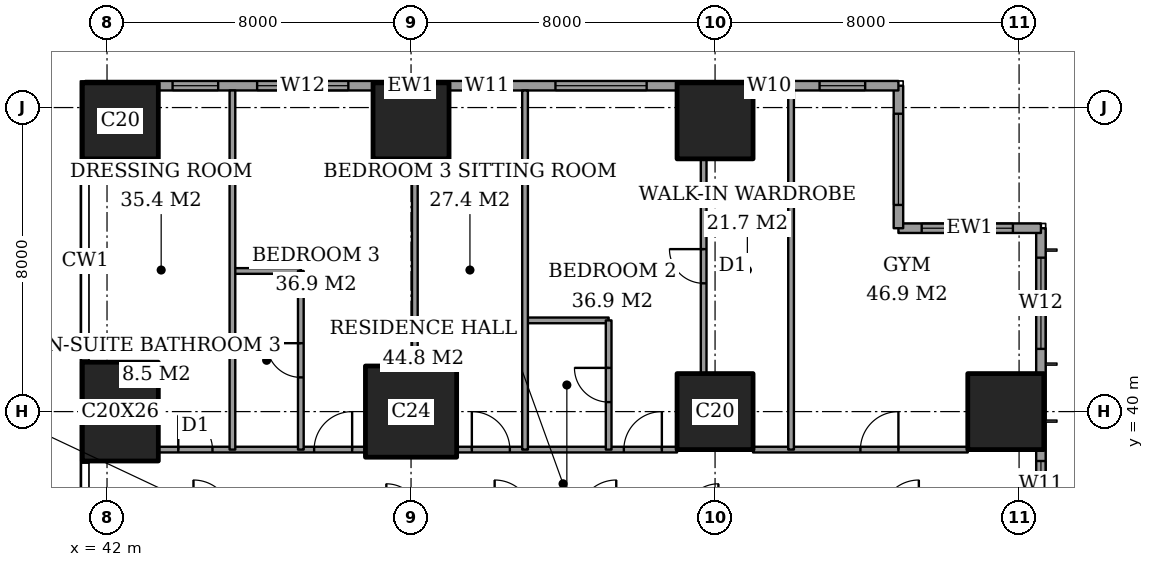
"""IFC4 building model, lengths in metres.
Left out: names, types, materials, properties, quantities, classifications, styles, units other than length and angle.
Written with IfcOpenShell. Run it as: python <this file> out.ifc"""

import sys

from ifc_helpers import new_model, si_unit, direction, frame, frame_2d, origin, origin_2d, place, context, subcontext, project, spatial, rectangle, extrude, element, fill, save


model = new_model("IFC4")
c1 = context("Model", 3, precision=1e-05, world=origin(), true_north=direction((0.0, 1.0)))
c2 = subcontext(c1, "Body", "Model", "MODEL_VIEW")
j1 = project(units=[si_unit("LENGTHUNIT", "METRE"), si_unit("PLANEANGLEUNIT", "RADIAN")], contexts=[c1])
p1 = place(None, origin())
s1 = spatial("IfcSite", under=j1, at=p1, CompositionType="ELEMENT")
p2 = place(p1, origin())
s2 = spatial("IfcBuilding", under=s1, at=p2, CompositionType="ELEMENT")
p3 = place(p2, frame((0.0, 0.0, 146.6)))
s3 = spatial("IfcBuildingStorey", under=s2, at=p3, CompositionType="ELEMENT", Elevation=146.6)
p4 = place(p3, frame((42.35, 40.0, 0.0), z_axis=(0.0, 0.0, 1.0), x_axis=(1.0, 0.0, 0.0)))
e1 = element("IfcColumn", 1, at=p4, inside=s3, PredefinedType="COLUMN", context=c2, shape_type="SweptSolid", body=[
    extrude(rectangle(XDim=2.0, YDim=2.6, at=origin_2d()), origin(), (0.0, 0.0, 1.0), 3.6),
])
p5 = place(p3, frame((42.35, 47.65, 0.0), z_axis=(0.0, 0.0, 1.0), x_axis=(1.0, 0.0, 0.0)))
e2 = element("IfcColumn", 2, at=p5, inside=s3, PredefinedType="COLUMN", context=c2, shape_type="SweptSolid", body=[
    extrude(rectangle(XDim=2.0, YDim=2.0, at=origin_2d()), origin(), (0.0, 0.0, 1.0), 3.6),
])
p6 = place(p3, frame((50.0, 40.0, 0.0), z_axis=(0.0, 0.0, 1.0), x_axis=(1.0, 0.0, 0.0)))
e3 = element("IfcColumn", 3, at=p6, inside=s3, PredefinedType="COLUMN", context=c2, shape_type="SweptSolid", body=[
    extrude(rectangle(XDim=2.4, YDim=2.4, at=origin_2d()), origin(), (0.0, 0.0, 1.0), 3.6),
])
for number, where, z_axis, x_axis in (
    (4, (50.0, 47.65, 0.0), (0.0, 0.0, 1.0), (1.0, 0.0, 0.0)),
    (5, (58.0, 40.0, 0.0), (0.0, 0.0, 1.0), (1.0, 0.0, 0.0)),
    (6, (58.0, 47.65, 0.0), (0.0, 0.0, 1.0), (1.0, 0.0, 0.0)),
    (7, (65.65, 40.0, 0.0), (0.0, 0.0, 1.0), (1.0, 0.0, 0.0)),
):
    element("IfcColumn", number, at=place(p3, frame(where, z_axis=z_axis, x_axis=x_axis)), inside=s3, PredefinedType="COLUMN", context=c2, shape_type="SweptSolid", body=[
        extrude(rectangle(XDim=2.0, YDim=2.0, at=origin_2d()), origin(), (0.0, 0.0, 1.0), 3.6),
    ])
p7 = place(p3, frame((66.575, 3.175, 0.0), z_axis=(0.0, 0.0, 1.0), x_axis=(0.0, 1.0, 0.0)))
e8 = element("IfcWall", 8, at=p7, inside=s3, PredefinedType="SOLIDWALL", context=c2, shape_type="SweptSolid", body=[
    extrude(rectangle(XDim=41.65, YDim=0.25, at=frame_2d((20.825, 0.0))), origin(), (0.0, 0.0, 1.0), 3.6),
])
p8 = place(p7, frame((0.775, 0.0, 0.4)))
e9 = element("IfcOpeningElement", 9, at=p8, cuts=e8, PredefinedType="OPENING", context=c2, shape_type="SweptSolid", body=[
    extrude(rectangle(XDim=2.4, YDim=2.2, at=frame_2d((1.2, 1.1))), frame((0.0, 0.135, 0.0), z_axis=(0.0, -1.0, 0.0), x_axis=(1.0, 0.0, 0.0)), (0.0, 0.0, 1.0), 0.27),
])
p9 = place(p7, frame((6.1, 0.0, 0.4)))
e10 = element("IfcOpeningElement", 10, at=p9, cuts=e8, PredefinedType="OPENING", context=c2, shape_type="SweptSolid", body=[
    extrude(rectangle(XDim=1.2, YDim=2.2, at=frame_2d((0.6, 1.1))), frame((0.0, 0.135, 0.0), z_axis=(0.0, -1.0, 0.0), x_axis=(1.0, 0.0, 0.0)), (0.0, 0.0, 1.0), 0.27),
])
p10 = place(p7, frame((8.275, 0.0, 0.4)))
e11 = element("IfcOpeningElement", 11, at=p10, cuts=e8, PredefinedType="OPENING", context=c2, shape_type="SweptSolid", body=[
    extrude(rectangle(XDim=2.4, YDim=2.2, at=frame_2d((1.2, 1.1))), frame((0.0, 0.135, 0.0), z_axis=(0.0, -1.0, 0.0), x_axis=(1.0, 0.0, 0.0)), (0.0, 0.0, 1.0), 0.27),
])
p11 = place(p7, frame((15.775, 0.0, 0.4)))
e12 = element("IfcOpeningElement", 12, at=p11, cuts=e8, PredefinedType="OPENING", context=c2, shape_type="SweptSolid", body=[
    extrude(rectangle(XDim=2.4, YDim=2.2, at=frame_2d((1.2, 1.1))), frame((0.0, 0.135, 0.0), z_axis=(0.0, -1.0, 0.0), x_axis=(1.0, 0.0, 0.0)), (0.0, 0.0, 1.0), 0.27),
])
p12 = place(p7, frame((23.475, 0.0, 0.4)))
e13 = element("IfcOpeningElement", 13, at=p12, cuts=e8, PredefinedType="OPENING", context=c2, shape_type="SweptSolid", body=[
    extrude(rectangle(XDim=2.4, YDim=2.2, at=frame_2d((1.2, 1.1))), frame((0.0, 0.135, 0.0), z_axis=(0.0, -1.0, 0.0), x_axis=(1.0, 0.0, 0.0)), (0.0, 0.0, 1.0), 0.27),
])
p13 = place(p7, frame((30.875, 0.0, 0.4)))
e14 = element("IfcOpeningElement", 14, at=p13, cuts=e8, PredefinedType="OPENING", context=c2, shape_type="SweptSolid", body=[
    extrude(rectangle(XDim=2.4, YDim=2.2, at=frame_2d((1.2, 1.1))), frame((0.0, 0.135, 0.0), z_axis=(0.0, -1.0, 0.0), x_axis=(1.0, 0.0, 0.0)), (0.0, 0.0, 1.0), 0.27),
])
p14 = place(p7, frame((34.325, 0.0, 0.4)))
e15 = element("IfcOpeningElement", 15, at=p14, cuts=e8, PredefinedType="OPENING", context=c2, shape_type="SweptSolid", body=[
    extrude(rectangle(XDim=1.2, YDim=2.2, at=frame_2d((0.6, 1.1))), frame((0.0, 0.135, 0.0), z_axis=(0.0, -1.0, 0.0), x_axis=(1.0, 0.0, 0.0)), (0.0, 0.0, 1.0), 0.27),
])
p15 = place(p7, frame((38.475, 0.0, 0.4)))
e16 = element("IfcOpeningElement", 16, at=p15, cuts=e8, PredefinedType="OPENING", context=c2, shape_type="SweptSolid", body=[
    extrude(rectangle(XDim=2.4, YDim=2.2, at=frame_2d((1.2, 1.1))), frame((0.0, 0.135, 0.0), z_axis=(0.0, -1.0, 0.0), x_axis=(1.0, 0.0, 0.0)), (0.0, 0.0, 1.0), 0.27),
])
p16 = place(p3, frame((66.575, 44.825, 0.0), z_axis=(0.0, 0.0, 1.0), x_axis=(-1.0, 0.0, 0.0)))
e17 = element("IfcWall", 17, at=p16, inside=s3, PredefinedType="SOLIDWALL", context=c2, shape_type="SweptSolid", body=[
    extrude(rectangle(XDim=3.75, YDim=0.25, at=frame_2d((1.875, 0.0))), origin(), (0.0, 0.0, 1.0), 3.6),
])
p17 = place(p16, frame((0.738, 0.0, 0.4)))
e18 = element("IfcOpeningElement", 18, at=p17, cuts=e17, PredefinedType="OPENING", context=c2, shape_type="SweptSolid", body=[
    extrude(rectangle(XDim=2.4, YDim=2.2, at=frame_2d((1.2, 1.1))), frame((0.0, 0.135, 0.0), z_axis=(0.0, -1.0, 0.0), x_axis=(1.0, 0.0, 0.0)), (0.0, 0.0, 1.0), 0.27),
])
p18 = place(p3, frame((62.825, 44.825, 0.0), z_axis=(0.0, 0.0, 1.0), x_axis=(0.0, 1.0, 0.0)))
e19 = element("IfcWall", 19, at=p18, inside=s3, PredefinedType="SOLIDWALL", context=c2, shape_type="SweptSolid", body=[
    extrude(rectangle(XDim=3.75, YDim=0.25, at=frame_2d((1.875, 0.0))), origin(), (0.0, 0.0, 1.0), 3.6),
])
p19 = place(p18, frame((0.613, 0.0, 0.4)))
e20 = element("IfcOpeningElement", 20, at=p19, cuts=e19, PredefinedType="OPENING", context=c2, shape_type="SweptSolid", body=[
    extrude(rectangle(XDim=2.4, YDim=2.2, at=frame_2d((1.2, 1.1))), frame((0.0, 0.135, 0.0), z_axis=(0.0, -1.0, 0.0), x_axis=(1.0, 0.0, 0.0)), (0.0, 0.0, 1.0), 0.27),
])
p20 = place(p3, frame((62.825, 48.575, 0.0), z_axis=(0.0, 0.0, 1.0), x_axis=(-1.0, 0.0, 0.0)))
e21 = element("IfcWall", 21, at=p20, inside=s3, PredefinedType="SOLIDWALL", context=c2, shape_type="SweptSolid", body=[
    extrude(rectangle(XDim=21.4, YDim=0.25, at=frame_2d((10.7, 0.0))), origin(), (0.0, 0.0, 1.0), 3.6),
])
p21 = place(p20, frame((0.875, 0.0, 0.4)))
e22 = element("IfcOpeningElement", 22, at=p21, cuts=e21, PredefinedType="OPENING", context=c2, shape_type="SweptSolid", body=[
    extrude(rectangle(XDim=1.2, YDim=2.2, at=frame_2d((0.6, 1.1))), frame((0.0, 0.135, 0.0), z_axis=(0.0, -1.0, 0.0), x_axis=(1.0, 0.0, 0.0)), (0.0, 0.0, 1.0), 0.27),
])
p22 = place(p20, frame((3.1, 0.0, 0.4)))
e23 = element("IfcOpeningElement", 23, at=p22, cuts=e21, PredefinedType="OPENING", context=c2, shape_type="SweptSolid", body=[
    extrude(rectangle(XDim=0.6, YDim=2.2, at=frame_2d((0.3, 1.1))), frame((0.0, 0.135, 0.0), z_axis=(0.0, -1.0, 0.0), x_axis=(1.0, 0.0, 0.0)), (0.0, 0.0, 1.0), 0.27),
])
p23 = place(p20, frame((6.625, 0.0, 0.4)))
e24 = element("IfcOpeningElement", 24, at=p23, cuts=e21, PredefinedType="OPENING", context=c2, shape_type="SweptSolid", body=[
    extrude(rectangle(XDim=2.4, YDim=2.2, at=frame_2d((1.2, 1.1))), frame((0.0, 0.135, 0.0), z_axis=(0.0, -1.0, 0.0), x_axis=(1.0, 0.0, 0.0)), (0.0, 0.0, 1.0), 0.27),
])
p24 = place(p20, frame((10.225, 0.0, 0.4)))
e25 = element("IfcOpeningElement", 25, at=p24, cuts=e21, PredefinedType="OPENING", context=c2, shape_type="SweptSolid", body=[
    extrude(rectangle(XDim=1.2, YDim=2.2, at=frame_2d((0.6, 1.1))), frame((0.0, 0.135, 0.0), z_axis=(0.0, -1.0, 0.0), x_axis=(1.0, 0.0, 0.0)), (0.0, 0.0, 1.0), 0.27),
])
p25 = place(p20, frame((14.475, 0.0, 0.4)))
e26 = element("IfcOpeningElement", 26, at=p25, cuts=e21, PredefinedType="OPENING", context=c2, shape_type="SweptSolid", body=[
    extrude(rectangle(XDim=2.4, YDim=2.2, at=frame_2d((1.2, 1.1))), frame((0.0, 0.135, 0.0), z_axis=(0.0, -1.0, 0.0), x_axis=(1.0, 0.0, 0.0)), (0.0, 0.0, 1.0), 0.27),
])
p26 = place(p20, frame((17.9, 0.0, 0.4)))
e27 = element("IfcOpeningElement", 27, at=p26, cuts=e21, PredefinedType="OPENING", context=c2, shape_type="SweptSolid", body=[
    extrude(rectangle(XDim=1.2, YDim=2.2, at=frame_2d((0.6, 1.1))), frame((0.0, 0.135, 0.0), z_axis=(0.0, -1.0, 0.0), x_axis=(1.0, 0.0, 0.0)), (0.0, 0.0, 1.0), 0.27),
])
p27 = place(p3, frame((43.35, 39.0, 0.0), z_axis=(0.0, 0.0, 1.0), x_axis=(1.0, 0.0, 0.0)))
e28 = element("IfcWall", 28, at=p27, inside=s3, PredefinedType="PARTITIONING", context=c2, shape_type="SweptSolid", body=[
    extrude(rectangle(XDim=5.45, YDim=0.15, at=frame_2d((2.725, 0.0))), origin(), (0.0, 0.0, 1.0), 3.35),
])
p28 = place(p27, frame((4.1, 0.0, 0.0)))
e29 = element("IfcOpeningElement", 29, at=p28, cuts=e28, PredefinedType="OPENING", context=c2, shape_type="SweptSolid", body=[
    extrude(rectangle(XDim=1.0, YDim=2.1, at=frame_2d((0.5, 1.05))), frame((0.0, 0.085, 0.0), z_axis=(0.0, -1.0, 0.0), x_axis=(1.0, 0.0, 0.0)), (0.0, 0.0, 1.0), 0.17),
])
p29 = place(p27, frame((0.525, 0.0, 0.0)))
e30 = element("IfcOpeningElement", 30, at=p29, cuts=e28, PredefinedType="OPENING", context=c2, shape_type="SweptSolid", body=[
    extrude(rectangle(XDim=0.9, YDim=2.1, at=frame_2d((0.45, 1.05))), frame((0.0, 0.085, 0.0), z_axis=(0.0, -1.0, 0.0), x_axis=(1.0, 0.0, 0.0)), (0.0, 0.0, 1.0), 0.17),
])
p30 = place(p3, frame((51.2, 39.0, 0.0), z_axis=(0.0, 0.0, 1.0), x_axis=(1.0, 0.0, 0.0)))
e31 = element("IfcWall", 31, at=p30, inside=s3, PredefinedType="PARTITIONING", context=c2, shape_type="SweptSolid", body=[
    extrude(rectangle(XDim=5.8, YDim=0.15, at=frame_2d((2.9, 0.0))), origin(), (0.0, 0.0, 1.0), 3.35),
])
p31 = place(p30, frame((4.4, 0.0, 0.0)))
e32 = element("IfcOpeningElement", 32, at=p31, cuts=e31, PredefinedType="OPENING", context=c2, shape_type="SweptSolid", body=[
    extrude(rectangle(XDim=1.0, YDim=2.1, at=frame_2d((0.5, 1.05))), frame((0.0, 0.085, 0.0), z_axis=(0.0, -1.0, 0.0), x_axis=(1.0, 0.0, 0.0)), (0.0, 0.0, 1.0), 0.17),
])
p32 = place(p30, frame((0.4, 0.0, 0.0)))
e33 = element("IfcOpeningElement", 33, at=p32, cuts=e31, PredefinedType="OPENING", context=c2, shape_type="SweptSolid", body=[
    extrude(rectangle(XDim=1.0, YDim=2.1, at=frame_2d((0.5, 1.05))), frame((0.0, 0.085, 0.0), z_axis=(0.0, -1.0, 0.0), x_axis=(1.0, 0.0, 0.0)), (0.0, 0.0, 1.0), 0.17),
])
p33 = place(p3, frame((59.0, 39.0, 0.0), z_axis=(0.0, 0.0, 1.0), x_axis=(1.0, 0.0, 0.0)))
e34 = element("IfcWall", 34, at=p33, inside=s3, PredefinedType="PARTITIONING", context=c2, shape_type="SweptSolid", body=[
    extrude(rectangle(XDim=5.65, YDim=0.15, at=frame_2d((2.825, 0.0))), origin(), (0.0, 0.0, 1.0), 3.35),
])
p34 = place(p33, frame((2.825, 0.0, 0.0)))
e35 = element("IfcOpeningElement", 35, at=p34, cuts=e34, PredefinedType="OPENING", context=c2, shape_type="SweptSolid", body=[
    extrude(rectangle(XDim=1.0, YDim=2.1, at=frame_2d((0.5, 1.05))), frame((0.0, 0.085, 0.0), z_axis=(0.0, -1.0, 0.0), x_axis=(1.0, 0.0, 0.0)), (0.0, 0.0, 1.0), 0.17),
])
p35 = place(p3, frame((53.0, 42.4, 0.0), z_axis=(0.0, 0.0, 1.0), x_axis=(1.0, 0.0, 0.0)))
e36 = element("IfcWall", 36, at=p35, inside=s3, PredefinedType="PARTITIONING", context=c2, shape_type="SweptSolid", body=[
    extrude(rectangle(XDim=2.2, YDim=0.15, at=frame_2d((1.1, 0.0))), origin(), (0.0, 0.0, 1.0), 3.35),
])
p36 = place(p3, frame((45.3, 43.7, 0.0), z_axis=(0.0, 0.0, 1.0), x_axis=(1.0, 0.0, 0.0)))
e37 = element("IfcWall", 37, at=p36, inside=s3, PredefinedType="PARTITIONING", context=c2, shape_type="SweptSolid", body=[
    extrude(rectangle(XDim=1.8, YDim=0.15, at=frame_2d((0.9, 0.0))), origin(), (0.0, 0.0, 1.0), 3.35),
])
p37 = place(p3, frame((45.3, 39.0, 0.0), z_axis=(0.0, 0.0, 1.0), x_axis=(0.0, 1.0, 0.0)))
e38 = element("IfcWall", 38, at=p37, inside=s3, PredefinedType="PARTITIONING", context=c2, shape_type="SweptSolid", body=[
    extrude(rectangle(XDim=9.45, YDim=0.15, at=frame_2d((4.725, 0.0))), origin(), (0.0, 0.0, 1.0), 3.35),
])
p38 = place(p3, frame((47.1, 39.0, 0.0), z_axis=(0.0, 0.0, 1.0), x_axis=(0.0, 1.0, 0.0)))
e39 = element("IfcWall", 39, at=p38, inside=s3, PredefinedType="PARTITIONING", context=c2, shape_type="SweptSolid", body=[
    extrude(rectangle(XDim=4.7, YDim=0.15, at=frame_2d((2.35, 0.0))), origin(), (0.0, 0.0, 1.0), 3.35),
])
p39 = place(p38, frame((1.9, 0.0, 0.0)))
e40 = element("IfcOpeningElement", 40, at=p39, cuts=e39, PredefinedType="OPENING", context=c2, shape_type="SweptSolid", body=[
    extrude(rectangle(XDim=0.9, YDim=2.1, at=frame_2d((0.45, 1.05))), frame((0.0, 0.085, 0.0), z_axis=(0.0, -1.0, 0.0), x_axis=(1.0, 0.0, 0.0)), (0.0, 0.0, 1.0), 0.17),
])
p40 = place(p3, frame((50.1, 41.2, 0.0), z_axis=(0.0, 0.0, 1.0), x_axis=(0.0, 1.0, 0.0)))
e41 = element("IfcWall", 41, at=p40, inside=s3, PredefinedType="PARTITIONING", context=c2, shape_type="SweptSolid", body=[
    extrude(rectangle(XDim=5.45, YDim=0.15, at=frame_2d((2.725, 0.0))), origin(), (0.0, 0.0, 1.0), 3.35),
])
p41 = place(p3, frame((53.0, 39.0, 0.0), z_axis=(0.0, 0.0, 1.0), x_axis=(0.0, 1.0, 0.0)))
e42 = element("IfcWall", 42, at=p41, inside=s3, PredefinedType="PARTITIONING", context=c2, shape_type="SweptSolid", body=[
    extrude(rectangle(XDim=9.45, YDim=0.15, at=frame_2d((4.725, 0.0))), origin(), (0.0, 0.0, 1.0), 3.35),
])
p42 = place(p3, frame((55.2, 39.0, 0.0), z_axis=(0.0, 0.0, 1.0), x_axis=(0.0, 1.0, 0.0)))
e43 = element("IfcWall", 43, at=p42, inside=s3, PredefinedType="PARTITIONING", context=c2, shape_type="SweptSolid", body=[
    extrude(rectangle(XDim=3.4, YDim=0.15, at=frame_2d((1.7, 0.0))), origin(), (0.0, 0.0, 1.0), 3.35),
])
p43 = place(p42, frame((1.25, 0.0, 0.0)))
e44 = element("IfcOpeningElement", 44, at=p43, cuts=e43, PredefinedType="OPENING", context=c2, shape_type="SweptSolid", body=[
    extrude(rectangle(XDim=0.9, YDim=2.1, at=frame_2d((0.45, 1.05))), frame((0.0, 0.085, 0.0), z_axis=(0.0, -1.0, 0.0), x_axis=(1.0, 0.0, 0.0)), (0.0, 0.0, 1.0), 0.17),
])
p44 = place(p3, frame((57.7, 41.0, 0.0), z_axis=(0.0, 0.0, 1.0), x_axis=(0.0, 1.0, 0.0)))
e45 = element("IfcWall", 45, at=p44, inside=s3, PredefinedType="PARTITIONING", context=c2, shape_type="SweptSolid", body=[
    extrude(rectangle(XDim=5.65, YDim=0.15, at=frame_2d((2.825, 0.0))), origin(), (0.0, 0.0, 1.0), 3.35),
])
p45 = place(p44, frame((2.375, 0.0, 0.0)))
e46 = element("IfcOpeningElement", 46, at=p45, cuts=e45, PredefinedType="OPENING", context=c2, shape_type="SweptSolid", body=[
    extrude(rectangle(XDim=0.9, YDim=2.1, at=frame_2d((0.45, 1.05))), frame((0.0, 0.085, 0.0), z_axis=(0.0, -1.0, 0.0), x_axis=(1.0, 0.0, 0.0)), (0.0, 0.0, 1.0), 0.17),
])
p46 = place(p3, frame((60.0, 39.0, 0.0), z_axis=(0.0, 0.0, 1.0), x_axis=(0.0, 1.0, 0.0)))
e47 = element("IfcWall", 47, at=p46, inside=s3, PredefinedType="PARTITIONING", context=c2, shape_type="SweptSolid", body=[
    extrude(rectangle(XDim=9.45, YDim=0.15, at=frame_2d((4.725, 0.0))), origin(), (0.0, 0.0, 1.0), 3.35),
])
p47 = place(p14, origin())
e48 = element("IfcWindow", 48, at=p47, inside=s3, PartitioningType="SINGLE_PANEL", PredefinedType="WINDOW", context=c2, shape_type="SweptSolid", body=[
    extrude(rectangle(XDim=1.2, YDim=2.2, at=frame_2d((0.6, 1.1))), frame((0.0, 0.03, 0.0), z_axis=(0.0, -1.0, 0.0), x_axis=(1.0, 0.0, 0.0)), (0.0, 0.0, 1.0), 0.06),
])
fill(e15, e48)
p48 = place(p15, origin())
e49 = element("IfcWindow", 49, at=p48, inside=s3, PartitioningType="SINGLE_PANEL", PredefinedType="WINDOW", context=c2, shape_type="SweptSolid", body=[
    extrude(rectangle(XDim=2.4, YDim=2.2, at=frame_2d((1.2, 1.1))), frame((0.0, 0.03, 0.0), z_axis=(0.0, -1.0, 0.0), x_axis=(1.0, 0.0, 0.0)), (0.0, 0.0, 1.0), 0.06),
])
fill(e16, e49)
p49 = place(p17, origin())
e50 = element("IfcWindow", 50, at=p49, inside=s3, PartitioningType="SINGLE_PANEL", PredefinedType="WINDOW", context=c2, shape_type="SweptSolid", body=[
    extrude(rectangle(XDim=2.4, YDim=2.2, at=frame_2d((1.2, 1.1))), frame((0.0, 0.03, 0.0), z_axis=(0.0, -1.0, 0.0), x_axis=(1.0, 0.0, 0.0)), (0.0, 0.0, 1.0), 0.06),
])
fill(e18, e50)
p50 = place(p19, origin())
e51 = element("IfcWindow", 51, at=p50, inside=s3, PartitioningType="SINGLE_PANEL", PredefinedType="WINDOW", context=c2, shape_type="SweptSolid", body=[
    extrude(rectangle(XDim=2.4, YDim=2.2, at=frame_2d((1.2, 1.1))), frame((0.0, 0.03, 0.0), z_axis=(0.0, -1.0, 0.0), x_axis=(1.0, 0.0, 0.0)), (0.0, 0.0, 1.0), 0.06),
])
fill(e20, e51)
p51 = place(p21, origin())
e52 = element("IfcWindow", 52, at=p51, inside=s3, PartitioningType="SINGLE_PANEL", PredefinedType="WINDOW", context=c2, shape_type="SweptSolid", body=[
    extrude(rectangle(XDim=1.2, YDim=2.2, at=frame_2d((0.6, 1.1))), frame((0.0, 0.03, 0.0), z_axis=(0.0, -1.0, 0.0), x_axis=(1.0, 0.0, 0.0)), (0.0, 0.0, 1.0), 0.06),
])
fill(e22, e52)
p52 = place(p22, origin())
e53 = element("IfcWindow", 53, at=p52, inside=s3, PartitioningType="SINGLE_PANEL", PredefinedType="WINDOW", context=c2, shape_type="SweptSolid", body=[
    extrude(rectangle(XDim=0.6, YDim=2.2, at=frame_2d((0.3, 1.1))), frame((0.0, 0.03, 0.0), z_axis=(0.0, -1.0, 0.0), x_axis=(1.0, 0.0, 0.0)), (0.0, 0.0, 1.0), 0.06),
])
fill(e23, e53)
p53 = place(p23, origin())
e54 = element("IfcWindow", 54, at=p53, inside=s3, PartitioningType="SINGLE_PANEL", PredefinedType="WINDOW", context=c2, shape_type="SweptSolid", body=[
    extrude(rectangle(XDim=2.4, YDim=2.2, at=frame_2d((1.2, 1.1))), frame((0.0, 0.03, 0.0), z_axis=(0.0, -1.0, 0.0), x_axis=(1.0, 0.0, 0.0)), (0.0, 0.0, 1.0), 0.06),
])
fill(e24, e54)
p54 = place(p24, origin())
e55 = element("IfcWindow", 55, at=p54, inside=s3, PartitioningType="SINGLE_PANEL", PredefinedType="WINDOW", context=c2, shape_type="SweptSolid", body=[
    extrude(rectangle(XDim=1.2, YDim=2.2, at=frame_2d((0.6, 1.1))), frame((0.0, 0.03, 0.0), z_axis=(0.0, -1.0, 0.0), x_axis=(1.0, 0.0, 0.0)), (0.0, 0.0, 1.0), 0.06),
])
fill(e25, e55)
p55 = place(p25, origin())
e56 = element("IfcWindow", 56, at=p55, inside=s3, PartitioningType="SINGLE_PANEL", PredefinedType="WINDOW", context=c2, shape_type="SweptSolid", body=[
    extrude(rectangle(XDim=2.4, YDim=2.2, at=frame_2d((1.2, 1.1))), frame((0.0, 0.03, 0.0), z_axis=(0.0, -1.0, 0.0), x_axis=(1.0, 0.0, 0.0)), (0.0, 0.0, 1.0), 0.06),
])
fill(e26, e56)
p56 = place(p26, origin())
e57 = element("IfcWindow", 57, at=p56, inside=s3, PartitioningType="SINGLE_PANEL", PredefinedType="WINDOW", context=c2, shape_type="SweptSolid", body=[
    extrude(rectangle(XDim=1.2, YDim=2.2, at=frame_2d((0.6, 1.1))), frame((0.0, 0.03, 0.0), z_axis=(0.0, -1.0, 0.0), x_axis=(1.0, 0.0, 0.0)), (0.0, 0.0, 1.0), 0.06),
])
fill(e27, e57)
p57 = place(p34, origin())
e58 = element("IfcDoor", 58, at=p57, inside=s3, OperationType="SINGLE_SWING_LEFT", PredefinedType="DOOR", context=c2, shape_type="SweptSolid", body=[
    extrude(rectangle(XDim=1.0, YDim=2.1, at=frame_2d((0.5, 1.05))), frame((0.0, 0.025, 0.0), z_axis=(0.0, -1.0, 0.0), x_axis=(1.0, 0.0, 0.0)), (0.0, 0.0, 1.0), 0.05),
])
fill(e35, e58)
p58 = place(p45, origin())
e59 = element("IfcDoor", 59, at=p58, inside=s3, OperationType="SINGLE_SWING_LEFT", PredefinedType="DOOR", context=c2, shape_type="SweptSolid", body=[
    extrude(rectangle(XDim=0.9, YDim=2.1, at=frame_2d((0.45, 1.05))), frame((0.0, 0.025, 0.0), z_axis=(0.0, -1.0, 0.0), x_axis=(1.0, 0.0, 0.0)), (0.0, 0.0, 1.0), 0.05),
])
fill(e46, e59)
p59 = place(p43, origin())
e60 = element("IfcDoor", 60, at=p59, inside=s3, OperationType="SINGLE_SWING_LEFT", PredefinedType="DOOR", context=c2, shape_type="SweptSolid", body=[
    extrude(rectangle(XDim=0.9, YDim=2.1, at=frame_2d((0.45, 1.05))), frame((0.0, 0.025, 0.0), z_axis=(0.0, -1.0, 0.0), x_axis=(1.0, 0.0, 0.0)), (0.0, 0.0, 1.0), 0.05),
])
fill(e44, e60)
p60 = place(p31, origin())
e61 = element("IfcDoor", 61, at=p60, inside=s3, OperationType="SINGLE_SWING_LEFT", PredefinedType="DOOR", context=c2, shape_type="SweptSolid", body=[
    extrude(rectangle(XDim=1.0, YDim=2.1, at=frame_2d((0.5, 1.05))), frame((0.0, 0.025, 0.0), z_axis=(0.0, -1.0, 0.0), x_axis=(1.0, 0.0, 0.0)), (0.0, 0.0, 1.0), 0.05),
])
fill(e32, e61)
p61 = place(p32, origin())
e62 = element("IfcDoor", 62, at=p61, inside=s3, OperationType="SINGLE_SWING_RIGHT", PredefinedType="DOOR", context=c2, shape_type="SweptSolid", body=[
    extrude(rectangle(XDim=1.0, YDim=2.1, at=frame_2d((0.5, 1.05))), frame((0.0, 0.025, 0.0), z_axis=(0.0, -1.0, 0.0), x_axis=(1.0, 0.0, 0.0)), (0.0, 0.0, 1.0), 0.05),
])
fill(e33, e62)
p62 = place(p39, origin())
e63 = element("IfcDoor", 63, at=p62, inside=s3, OperationType="SINGLE_SWING_LEFT", PredefinedType="DOOR", context=c2, shape_type="SweptSolid", body=[
    extrude(rectangle(XDim=0.9, YDim=2.1, at=frame_2d((0.45, 1.05))), frame((0.0, 0.025, 0.0), z_axis=(0.0, -1.0, 0.0), x_axis=(1.0, 0.0, 0.0)), (0.0, 0.0, 1.0), 0.05),
])
fill(e40, e63)
p63 = place(p28, origin())
e64 = element("IfcDoor", 64, at=p63, inside=s3, OperationType="SINGLE_SWING_LEFT", PredefinedType="DOOR", context=c2, shape_type="SweptSolid", body=[
    extrude(rectangle(XDim=1.0, YDim=2.1, at=frame_2d((0.5, 1.05))), frame((0.0, 0.025, 0.0), z_axis=(0.0, -1.0, 0.0), x_axis=(1.0, 0.0, 0.0)), (0.0, 0.0, 1.0), 0.05),
])
fill(e29, e64)
p64 = place(p29, origin())
e65 = element("IfcDoor", 65, at=p64, inside=s3, OperationType="SINGLE_SWING_RIGHT", PredefinedType="DOOR", context=c2, shape_type="SweptSolid", body=[
    extrude(rectangle(XDim=0.9, YDim=2.1, at=frame_2d((0.45, 1.05))), frame((0.0, 0.025, 0.0), z_axis=(0.0, -1.0, 0.0), x_axis=(1.0, 0.0, 0.0)), (0.0, 0.0, 1.0), 0.05),
])
fill(e30, e65)
save(model, sys.argv[1])
